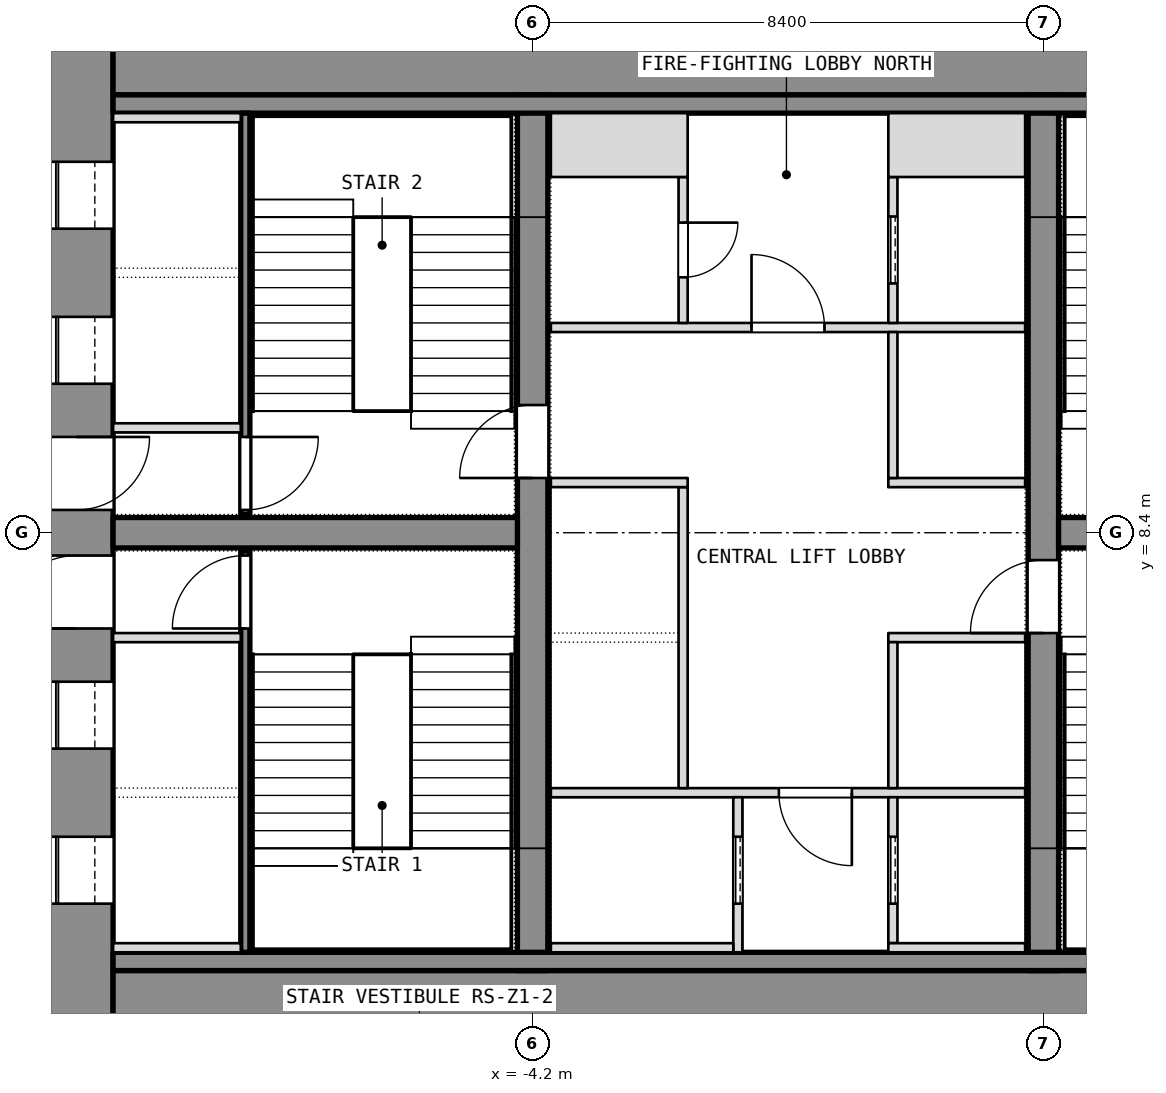
"""IFC4 building model, lengths in metres.
Left out: names, types, materials, properties, quantities, classifications, styles, units other than length and angle.
Written with IfcOpenShell. Run it as: python <this file> out.ifc"""

import sys

from ifc_helpers import new_model, si_unit, direction, frame, frame_2d, origin, place, context, subcontext, project, spatial, rectangle, extrude, element, fill, save


model = new_model("IFC4")
c1 = context("Model", 3, precision=1e-05, world=origin(), true_north=direction((0.0, 1.0)))
c2 = subcontext(c1, "Body", "Model", "MODEL_VIEW")
j1 = project(units=[si_unit("LENGTHUNIT", "METRE"), si_unit("PLANEANGLEUNIT", "RADIAN")], contexts=[c1])
p1 = place(None, origin())
s1 = spatial("IfcSite", under=j1, at=p1, CompositionType="ELEMENT")
p2 = place(p1, origin())
s2 = spatial("IfcBuilding", under=s1, at=p2, CompositionType="ELEMENT")
p3 = place(p2, frame((0.0, 0.0, 83.3)))
s3 = spatial("IfcBuildingStorey", under=s2, at=p3, CompositionType="ELEMENT", Elevation=83.3)
p4 = place(p3, frame((-11.7, 0.0, 0.0), z_axis=(0.0, 0.0, 1.0), x_axis=(0.0, 1.0, 0.0)))
e1 = element("IfcWall", 1, at=p4, inside=s3, PredefinedType="SHEAR", context=c2, shape_type="SweptSolid", body=[
    extrude(rectangle(XDim=16.8, YDim=1.2, at=frame_2d((8.4, 0.0))), origin(), (0.0, 0.0, 1.0), 3.6),
])
p5 = place(p4, frame((2.3, 0.0, 0.0)))
e2 = element("IfcOpeningElement", 2, at=p5, cuts=e1, PredefinedType="OPENING", context=c2, shape_type="SweptSolid", body=[
    extrude(rectangle(XDim=1.1, YDim=2.1, at=frame_2d((0.55, 1.05))), frame((0.0, 0.6, 0.0), z_axis=(0.0, -1.0, 0.0), x_axis=(1.0, 0.0, 0.0)), (0.0, 0.0, 1.0), 1.2),
])
p6 = place(p4, frame((4.85, 0.0, 0.0)))
e3 = element("IfcOpeningElement", 3, at=p6, cuts=e1, PredefinedType="OPENING", context=c2, shape_type="SweptSolid", body=[
    extrude(rectangle(XDim=1.1, YDim=2.1, at=frame_2d((0.55, 1.05))), frame((0.0, 0.6, 0.0), z_axis=(0.0, -1.0, 0.0), x_axis=(1.0, 0.0, 0.0)), (0.0, 0.0, 1.0), 1.2),
])
p7 = place(p4, frame((6.825, 0.0, 0.0)))
e4 = element("IfcOpeningElement", 4, at=p7, cuts=e1, PredefinedType="OPENING", context=c2, shape_type="SweptSolid", body=[
    extrude(rectangle(XDim=1.2, YDim=2.1, at=frame_2d((0.6, 1.05))), frame((0.0, 0.6, 0.0), z_axis=(0.0, -1.0, 0.0), x_axis=(1.0, 0.0, 0.0)), (0.0, 0.0, 1.0), 1.2),
])
p8 = place(p4, frame((13.4, 0.0, 0.0)))
e5 = element("IfcOpeningElement", 5, at=p8, cuts=e1, PredefinedType="OPENING", context=c2, shape_type="SweptSolid", body=[
    extrude(rectangle(XDim=1.1, YDim=2.1, at=frame_2d((0.55, 1.05))), frame((0.0, 0.6, 0.0), z_axis=(0.0, -1.0, 0.0), x_axis=(1.0, 0.0, 0.0)), (0.0, 0.0, 1.0), 1.2),
])
p9 = place(p4, frame((10.85, 0.0, 0.0)))
e6 = element("IfcOpeningElement", 6, at=p9, cuts=e1, PredefinedType="OPENING", context=c2, shape_type="SweptSolid", body=[
    extrude(rectangle(XDim=1.1, YDim=2.1, at=frame_2d((0.55, 1.05))), frame((0.0, 0.6, 0.0), z_axis=(0.0, -1.0, 0.0), x_axis=(1.0, 0.0, 0.0)), (0.0, 0.0, 1.0), 1.2),
])
p10 = place(p4, frame((8.775, 0.0, 0.0)))
e7 = element("IfcOpeningElement", 7, at=p10, cuts=e1, PredefinedType="OPENING", context=c2, shape_type="SweptSolid", body=[
    extrude(rectangle(XDim=1.2, YDim=2.1, at=frame_2d((0.6, 1.05))), frame((0.0, 0.6, 0.0), z_axis=(0.0, -1.0, 0.0), x_axis=(1.0, 0.0, 0.0)), (0.0, 0.0, 1.0), 1.2),
])
for number, where, z_axis, x_axis in (
    (8, (-11.1, 0.6, 0.0), (0.0, 0.0, 1.0), (1.0, 0.0, 0.0)),
    (9, (-11.1, 16.2, 0.0), (0.0, 0.0, 1.0), (1.0, 0.0, 0.0)),
):
    element("IfcWall", number, at=place(p3, frame(where, z_axis=z_axis, x_axis=x_axis)), inside=s3, PredefinedType="SHEAR", context=c2, shape_type="SweptSolid", body=[
        extrude(rectangle(XDim=22.2, YDim=1.2, at=frame_2d((11.1, 0.0))), origin(), (0.0, 0.0, 1.0), 3.6),
    ])
p11 = place(p3, frame((-4.2, 1.2, 0.0), z_axis=(0.0, 0.0, 1.0), x_axis=(0.0, 1.0, 0.0)))
e10 = element("IfcWall", 10, at=p11, inside=s3, PredefinedType="SHEAR", context=c2, shape_type="SweptSolid", body=[
    extrude(rectangle(XDim=14.4, YDim=0.5, at=frame_2d((7.2, 0.0))), origin(), (0.0, 0.0, 1.0), 3.6),
])
p12 = place(p11, frame((8.1, 0.0, 0.0)))
e11 = element("IfcOpeningElement", 11, at=p12, cuts=e10, PredefinedType="OPENING", context=c2, shape_type="SweptSolid", body=[
    extrude(rectangle(XDim=1.2, YDim=2.1, at=frame_2d((0.6, 1.05))), frame((0.0, 0.25, 0.0), z_axis=(0.0, -1.0, 0.0), x_axis=(1.0, 0.0, 0.0)), (0.0, 0.0, 1.0), 0.5),
])
p13 = place(p3, frame((4.2, 1.2, 0.0), z_axis=(0.0, 0.0, 1.0), x_axis=(0.0, 1.0, 0.0)))
e12 = element("IfcWall", 12, at=p13, inside=s3, PredefinedType="SHEAR", context=c2, shape_type="SweptSolid", body=[
    extrude(rectangle(XDim=14.4, YDim=0.5, at=frame_2d((7.2, 0.0))), origin(), (0.0, 0.0, 1.0), 3.6),
])
p14 = place(p13, frame((5.55, 0.0, 0.0)))
e13 = element("IfcOpeningElement", 13, at=p14, cuts=e12, PredefinedType="OPENING", context=c2, shape_type="SweptSolid", body=[
    extrude(rectangle(XDim=1.2, YDim=2.1, at=frame_2d((0.6, 1.05))), frame((0.0, 0.25, 0.0), z_axis=(0.0, -1.0, 0.0), x_axis=(1.0, 0.0, 0.0)), (0.0, 0.0, 1.0), 0.5),
])
for number, where, z_axis, x_axis in (
    (14, (-11.1, 8.4, 0.0), (0.0, 0.0, 1.0), (1.0, 0.0, 0.0)),
    (15, (4.45, 8.4, 0.0), (0.0, 0.0, 1.0), (1.0, 0.0, 0.0)),
):
    element("IfcWall", number, at=place(p3, frame(where, z_axis=z_axis, x_axis=x_axis)), inside=s3, PredefinedType="SHEAR", context=c2, shape_type="SweptSolid", body=[
        extrude(rectangle(XDim=6.65, YDim=0.5, at=frame_2d((3.325, 0.0))), origin(), (0.0, 0.0, 1.0), 3.6),
    ])
for number, where, z_axis, x_axis in (
    (16, (-11.1, 1.35, 0.0), (0.0, 0.0, 1.0), (1.0, 0.0, 0.0)),
    (17, (-11.1, 15.45, 0.0), (0.0, 0.0, 1.0), (1.0, 0.0, 0.0)),
):
    element("IfcWall", number, at=place(p3, frame(where, z_axis=z_axis, x_axis=x_axis)), inside=s3, PredefinedType="PARTITIONING", context=c2, shape_type="SweptSolid", body=[
        extrude(rectangle(XDim=22.2, YDim=0.3, at=frame_2d((11.1, 0.0))), origin(), (0.0, 0.0, 1.0), 3.3),
    ])
p15 = place(p3, frame((-8.925, 1.5, 0.0), z_axis=(0.0, 0.0, 1.0), x_axis=(0.0, 1.0, 0.0)))
e18 = element("IfcWall", 18, at=p15, inside=s3, PredefinedType="SHEAR", context=c2, shape_type="SweptSolid", body=[
    extrude(rectangle(XDim=6.6, YDim=0.15, at=frame_2d((3.3, 0.0))), origin(), (0.0, 0.0, 1.0), 3.3),
])
p16 = place(p15, frame((5.325, 0.0, 0.0)))
e19 = element("IfcOpeningElement", 19, at=p16, cuts=e18, PredefinedType="OPENING", context=c2, shape_type="SweptSolid", body=[
    extrude(rectangle(XDim=1.2, YDim=2.1, at=frame_2d((0.6, 1.05))), frame((0.0, 0.075, 0.0), z_axis=(0.0, -1.0, 0.0), x_axis=(1.0, 0.0, 0.0)), (0.0, 0.0, 1.0), 0.15),
])
for number, where, z_axis, x_axis in (
    (20, (-11.1, 6.675, 0.0), (0.0, 0.0, 1.0), (1.0, 0.0, 0.0)),
    (21, (-11.1, 1.575, 0.0), (0.0, 0.0, 1.0), (1.0, 0.0, 0.0)),
):
    element("IfcWall", number, at=place(p3, frame(where, z_axis=z_axis, x_axis=x_axis)), inside=s3, PredefinedType="SHEAR", context=c2, shape_type="SweptSolid", body=[
        extrude(rectangle(XDim=2.1, YDim=0.15, at=frame_2d((1.05, 0.0))), origin(), (0.0, 0.0, 1.0), 3.6),
    ])
p17 = place(p3, frame((-8.925, 8.7, 0.0), z_axis=(0.0, 0.0, 1.0), x_axis=(0.0, 1.0, 0.0)))
e22 = element("IfcWall", 22, at=p17, inside=s3, PredefinedType="SHEAR", context=c2, shape_type="SweptSolid", body=[
    extrude(rectangle(XDim=6.6, YDim=0.15, at=frame_2d((3.3, 0.0))), origin(), (0.0, 0.0, 1.0), 3.3),
])
p18 = place(p17, frame((0.075, 0.0, 0.0)))
e23 = element("IfcOpeningElement", 23, at=p18, cuts=e22, PredefinedType="OPENING", context=c2, shape_type="SweptSolid", body=[
    extrude(rectangle(XDim=1.2, YDim=2.1, at=frame_2d((0.6, 1.05))), frame((0.0, 0.075, 0.0), z_axis=(0.0, -1.0, 0.0), x_axis=(1.0, 0.0, 0.0)), (0.0, 0.0, 1.0), 0.15),
])
for number, where, z_axis, x_axis in (
    (24, (-11.1, 10.125, 0.0), (0.0, 0.0, 1.0), (1.0, 0.0, 0.0)),
    (25, (-11.1, 15.225, 0.0), (0.0, 0.0, 1.0), (1.0, 0.0, 0.0)),
):
    element("IfcWall", number, at=place(p3, frame(where, z_axis=z_axis, x_axis=x_axis)), inside=s3, PredefinedType="SHEAR", context=c2, shape_type="SweptSolid", body=[
        extrude(rectangle(XDim=2.1, YDim=0.15, at=frame_2d((1.05, 0.0))), origin(), (0.0, 0.0, 1.0), 3.6),
    ])
p19 = place(p3, frame((-3.9, 4.125, 0.0), z_axis=(0.0, 0.0, 1.0), x_axis=(1.0, 0.0, 0.0)))
e26 = element("IfcWall", 26, at=p19, inside=s3, PredefinedType="PARTITIONING", context=c2, shape_type="SweptSolid", body=[
    extrude(rectangle(XDim=7.8, YDim=0.15, at=frame_2d((3.9, 0.0))), origin(), (0.0, 0.0, 1.0), 3.3),
])
p20 = place(p19, frame((3.75, 0.0, 0.0)))
e27 = element("IfcOpeningElement", 27, at=p20, cuts=e26, PredefinedType="OPENING", context=c2, shape_type="SweptSolid", body=[
    extrude(rectangle(XDim=1.2, YDim=2.1, at=frame_2d((0.6, 1.05))), frame((0.0, 0.075, 0.0), z_axis=(0.0, -1.0, 0.0), x_axis=(1.0, 0.0, 0.0)), (0.0, 0.0, 1.0), 0.15),
])
p21 = place(p3, frame((-3.9, 11.775, 0.0), z_axis=(0.0, 0.0, 1.0), x_axis=(1.0, 0.0, 0.0)))
e28 = element("IfcWall", 28, at=p21, inside=s3, PredefinedType="PARTITIONING", context=c2, shape_type="SweptSolid", body=[
    extrude(rectangle(XDim=7.8, YDim=0.15, at=frame_2d((3.9, 0.0))), origin(), (0.0, 0.0, 1.0), 3.3),
])
p22 = place(p21, frame((3.3, 0.0, 0.0)))
e29 = element("IfcOpeningElement", 29, at=p22, cuts=e28, PredefinedType="OPENING", context=c2, shape_type="SweptSolid", body=[
    extrude(rectangle(XDim=1.2, YDim=2.1, at=frame_2d((0.6, 1.05))), frame((0.0, 0.075, 0.0), z_axis=(0.0, -1.0, 0.0), x_axis=(1.0, 0.0, 0.0)), (0.0, 0.0, 1.0), 0.15),
])
p23 = place(p3, frame((-0.825, 1.5, 0.0), z_axis=(0.0, 0.0, 1.0), x_axis=(0.0, 1.0, 0.0)))
e30 = element("IfcWall", 30, at=p23, inside=s3, PredefinedType="SHEAR", context=c2, shape_type="SweptSolid", body=[
    extrude(rectangle(XDim=2.55, YDim=0.15, at=frame_2d((1.275, 0.0))), origin(), (0.0, 0.0, 1.0), 3.6),
])
p24 = place(p23, frame((0.8, 0.0, 0.0)))
e31 = element("IfcOpeningElement", 31, at=p24, cuts=e30, PredefinedType="OPENING", context=c2, shape_type="SweptSolid", body=[
    extrude(rectangle(XDim=1.1, YDim=2.1, at=frame_2d((0.55, 1.05))), frame((0.0, 0.075, 0.0), z_axis=(0.0, -1.0, 0.0), x_axis=(1.0, 0.0, 0.0)), (0.0, 0.0, 1.0), 0.15),
])
p25 = place(p3, frame((-3.9, 1.575, 0.0), z_axis=(0.0, 0.0, 1.0), x_axis=(1.0, 0.0, 0.0)))
e32 = element("IfcWall", 32, at=p25, inside=s3, PredefinedType="SHEAR", context=c2, shape_type="SweptSolid", body=[
    extrude(rectangle(XDim=3.0, YDim=0.15, at=frame_2d((1.5, 0.0))), origin(), (0.0, 0.0, 1.0), 3.6),
])
p26 = place(p3, frame((-1.725, 4.2, 0.0), z_axis=(0.0, 0.0, 1.0), x_axis=(0.0, 1.0, 0.0)))
e33 = element("IfcWall", 33, at=p26, inside=s3, PredefinedType="SHEAR", context=c2, shape_type="SweptSolid", body=[
    extrude(rectangle(XDim=4.95, YDim=0.15, at=frame_2d((2.475, 0.0))), origin(), (0.0, 0.0, 1.0), 3.6),
])
p27 = place(p3, frame((-3.9, 9.225, 0.0), z_axis=(0.0, 0.0, 1.0), x_axis=(1.0, 0.0, 0.0)))
e34 = element("IfcWall", 34, at=p27, inside=s3, PredefinedType="SHEAR", context=c2, shape_type="SweptSolid", body=[
    extrude(rectangle(XDim=2.25, YDim=0.15, at=frame_2d((1.125, 0.0))), origin(), (0.0, 0.0, 1.0), 3.6),
])
p28 = place(p3, frame((-1.725, 11.85, 0.0), z_axis=(0.0, 0.0, 1.0), x_axis=(0.0, 1.0, 0.0)))
e35 = element("IfcWall", 35, at=p28, inside=s3, PredefinedType="PARTITIONING", context=c2, shape_type="SweptSolid", body=[
    extrude(rectangle(XDim=2.4, YDim=0.15, at=frame_2d((1.2, 0.0))), origin(), (0.0, 0.0, 1.0), 3.3),
])
p29 = place(p28, frame((0.75, 0.0, 0.0)))
e36 = element("IfcOpeningElement", 36, at=p29, cuts=e35, PredefinedType="OPENING", context=c2, shape_type="SweptSolid", body=[
    extrude(rectangle(XDim=0.9, YDim=2.1, at=frame_2d((0.45, 1.05))), frame((0.0, 0.075, 0.0), z_axis=(0.0, -1.0, 0.0), x_axis=(1.0, 0.0, 0.0)), (0.0, 0.0, 1.0), 0.15),
])
p30 = place(p3, frame((-3.9, 14.775, 0.0), z_axis=(0.0, 0.0, 1.0), x_axis=(1.0, 0.0, 0.0)))
e37 = element("IfcWall", 37, at=p30, inside=s3, PredefinedType="PARTITIONING", context=c2, shape_type="SweptSolid", body=[
    extrude(rectangle(XDim=2.25, YDim=1.05, at=frame_2d((1.125, 0.0))), origin(), (0.0, 0.0, 1.0), 3.3),
])
p31 = place(p3, frame((1.725, 1.65, 0.0), z_axis=(0.0, 0.0, 1.0), x_axis=(0.0, 1.0, 0.0)))
e38 = element("IfcWall", 38, at=p31, inside=s3, PredefinedType="SHEAR", context=c2, shape_type="SweptSolid", body=[
    extrude(rectangle(XDim=2.4, YDim=0.15, at=frame_2d((1.2, 0.0))), origin(), (0.0, 0.0, 1.0), 3.6),
])
p32 = place(p31, frame((0.65, 0.0, 0.0)))
e39 = element("IfcOpeningElement", 39, at=p32, cuts=e38, PredefinedType="OPENING", context=c2, shape_type="SweptSolid", body=[
    extrude(rectangle(XDim=1.1, YDim=2.1, at=frame_2d((0.55, 1.05))), frame((0.0, 0.075, 0.0), z_axis=(0.0, -1.0, 0.0), x_axis=(1.0, 0.0, 0.0)), (0.0, 0.0, 1.0), 0.15),
])
p33 = place(p3, frame((1.65, 1.575, 0.0), z_axis=(0.0, 0.0, 1.0), x_axis=(1.0, 0.0, 0.0)))
e40 = element("IfcWall", 40, at=p33, inside=s3, PredefinedType="SHEAR", context=c2, shape_type="SweptSolid", body=[
    extrude(rectangle(XDim=2.25, YDim=0.15, at=frame_2d((1.125, 0.0))), origin(), (0.0, 0.0, 1.0), 3.6),
])
p34 = place(p3, frame((1.725, 11.85, 0.0), z_axis=(0.0, 0.0, 1.0), x_axis=(0.0, 1.0, 0.0)))
e41 = element("IfcWall", 41, at=p34, inside=s3, PredefinedType="SHEAR", context=c2, shape_type="SweptSolid", body=[
    extrude(rectangle(XDim=2.4, YDim=0.15, at=frame_2d((1.2, 0.0))), origin(), (0.0, 0.0, 1.0), 3.6),
])
p35 = place(p34, frame((0.65, 0.0, 0.0)))
e42 = element("IfcOpeningElement", 42, at=p35, cuts=e41, PredefinedType="OPENING", context=c2, shape_type="SweptSolid", body=[
    extrude(rectangle(XDim=1.1, YDim=2.1, at=frame_2d((0.55, 1.05))), frame((0.0, 0.075, 0.0), z_axis=(0.0, -1.0, 0.0), x_axis=(1.0, 0.0, 0.0)), (0.0, 0.0, 1.0), 0.15),
])
p36 = place(p3, frame((1.65, 14.775, 0.0), z_axis=(0.0, 0.0, 1.0), x_axis=(1.0, 0.0, 0.0)))
e43 = element("IfcWall", 43, at=p36, inside=s3, PredefinedType="SHEAR", context=c2, shape_type="SweptSolid", body=[
    extrude(rectangle(XDim=2.25, YDim=1.05, at=frame_2d((1.125, 0.0))), origin(), (0.0, 0.0, 1.0), 3.6),
])
for number, where, z_axis, x_axis in (
    (44, (1.65, 6.675, 0.0), (0.0, 0.0, 1.0), (1.0, 0.0, 0.0)),
    (45, (1.65, 9.225, 0.0), (0.0, 0.0, 1.0), (1.0, 0.0, 0.0)),
):
    element("IfcWall", number, at=place(p3, frame(where, z_axis=z_axis, x_axis=x_axis)), inside=s3, PredefinedType="SHEAR", context=c2, shape_type="SweptSolid", body=[
        extrude(rectangle(XDim=2.25, YDim=0.15, at=frame_2d((1.125, 0.0))), origin(), (0.0, 0.0, 1.0), 3.6),
    ])
p37 = place(p3, frame((1.725, 4.2, 0.0), z_axis=(0.0, 0.0, 1.0), x_axis=(0.0, 1.0, 0.0)))
e46 = element("IfcWall", 46, at=p37, inside=s3, PredefinedType="SHEAR", context=c2, shape_type="SweptSolid", body=[
    extrude(rectangle(XDim=2.4, YDim=0.15, at=frame_2d((1.2, 0.0))), origin(), (0.0, 0.0, 1.0), 3.6),
])
p38 = place(p3, frame((1.725, 9.3, 0.0), z_axis=(0.0, 0.0, 1.0), x_axis=(0.0, 1.0, 0.0)))
e47 = element("IfcWall", 47, at=p38, inside=s3, PredefinedType="SHEAR", context=c2, shape_type="SweptSolid", body=[
    extrude(rectangle(XDim=2.4, YDim=0.15, at=frame_2d((1.2, 0.0))), origin(), (0.0, 0.0, 1.0), 3.6),
])
p39 = place(p5, origin())
e48 = element("IfcDoor", 48, at=p39, inside=s3, OperationType="SLIDING_TO_LEFT", PredefinedType="DOOR", context=c2, shape_type="SweptSolid", body=[
    extrude(rectangle(XDim=1.1, YDim=2.1, at=frame_2d((0.55, 1.05))), frame((0.0, 0.025, 0.0), z_axis=(0.0, -1.0, 0.0), x_axis=(1.0, 0.0, 0.0)), (0.0, 0.0, 1.0), 0.05),
])
fill(e2, e48)
p40 = place(p6, origin())
e49 = element("IfcDoor", 49, at=p40, inside=s3, OperationType="SLIDING_TO_LEFT", PredefinedType="DOOR", context=c2, shape_type="SweptSolid", body=[
    extrude(rectangle(XDim=1.1, YDim=2.1, at=frame_2d((0.55, 1.05))), frame((0.0, 0.025, 0.0), z_axis=(0.0, -1.0, 0.0), x_axis=(1.0, 0.0, 0.0)), (0.0, 0.0, 1.0), 0.05),
])
fill(e3, e49)
p41 = place(p7, origin())
e50 = element("IfcDoor", 50, at=p41, inside=s3, OperationType="SINGLE_SWING_LEFT", PredefinedType="DOOR", context=c2, shape_type="SweptSolid", body=[
    extrude(rectangle(XDim=1.2, YDim=2.1, at=frame_2d((0.6, 1.05))), frame((0.0, 0.025, 0.0), z_axis=(0.0, -1.0, 0.0), x_axis=(1.0, 0.0, 0.0)), (0.0, 0.0, 1.0), 0.05),
])
fill(e4, e50)
p42 = place(p16, origin())
e51 = element("IfcDoor", 51, at=p42, inside=s3, OperationType="SINGLE_SWING_LEFT", PredefinedType="DOOR", context=c2, shape_type="SweptSolid", body=[
    extrude(rectangle(XDim=1.2, YDim=2.1, at=frame_2d((0.6, 1.05))), frame((0.0, 0.025, 0.0), z_axis=(0.0, -1.0, 0.0), x_axis=(1.0, 0.0, 0.0)), (0.0, 0.0, 1.0), 0.05),
])
fill(e19, e51)
p43 = place(p8, origin())
e52 = element("IfcDoor", 52, at=p43, inside=s3, OperationType="SLIDING_TO_LEFT", PredefinedType="DOOR", context=c2, shape_type="SweptSolid", body=[
    extrude(rectangle(XDim=1.1, YDim=2.1, at=frame_2d((0.55, 1.05))), frame((0.0, 0.025, 0.0), z_axis=(0.0, -1.0, 0.0), x_axis=(1.0, 0.0, 0.0)), (0.0, 0.0, 1.0), 0.05),
])
fill(e5, e52)
p44 = place(p9, origin())
e53 = element("IfcDoor", 53, at=p44, inside=s3, OperationType="SLIDING_TO_LEFT", PredefinedType="DOOR", context=c2, shape_type="SweptSolid", body=[
    extrude(rectangle(XDim=1.1, YDim=2.1, at=frame_2d((0.55, 1.05))), frame((0.0, 0.025, 0.0), z_axis=(0.0, -1.0, 0.0), x_axis=(1.0, 0.0, 0.0)), (0.0, 0.0, 1.0), 0.05),
])
fill(e6, e53)
p45 = place(p10, origin())
e54 = element("IfcDoor", 54, at=p45, inside=s3, OperationType="SINGLE_SWING_LEFT", PredefinedType="DOOR", context=c2, shape_type="SweptSolid", body=[
    extrude(rectangle(XDim=1.2, YDim=2.1, at=frame_2d((0.6, 1.05))), frame((0.0, 0.025, 0.0), z_axis=(0.0, -1.0, 0.0), x_axis=(1.0, 0.0, 0.0)), (0.0, 0.0, 1.0), 0.05),
])
fill(e7, e54)
p46 = place(p18, origin())
e55 = element("IfcDoor", 55, at=p46, inside=s3, OperationType="SINGLE_SWING_LEFT", PredefinedType="DOOR", context=c2, shape_type="SweptSolid", body=[
    extrude(rectangle(XDim=1.2, YDim=2.1, at=frame_2d((0.6, 1.05))), frame((0.0, 0.025, 0.0), z_axis=(0.0, -1.0, 0.0), x_axis=(1.0, 0.0, 0.0)), (0.0, 0.0, 1.0), 0.05),
])
fill(e23, e55)
p47 = place(p24, origin())
e56 = element("IfcDoor", 56, at=p47, inside=s3, OperationType="SLIDING_TO_LEFT", PredefinedType="DOOR", context=c2, shape_type="SweptSolid", body=[
    extrude(rectangle(XDim=1.1, YDim=2.1, at=frame_2d((0.55, 1.05))), frame((0.0, 0.025, 0.0), z_axis=(0.0, -1.0, 0.0), x_axis=(1.0, 0.0, 0.0)), (0.0, 0.0, 1.0), 0.05),
])
fill(e31, e56)
p48 = place(p32, origin())
e57 = element("IfcDoor", 57, at=p48, inside=s3, OperationType="SLIDING_TO_LEFT", PredefinedType="DOOR", context=c2, shape_type="SweptSolid", body=[
    extrude(rectangle(XDim=1.1, YDim=2.1, at=frame_2d((0.55, 1.05))), frame((0.0, 0.025, 0.0), z_axis=(0.0, -1.0, 0.0), x_axis=(1.0, 0.0, 0.0)), (0.0, 0.0, 1.0), 0.05),
])
fill(e39, e57)
p49 = place(p35, origin())
e58 = element("IfcDoor", 58, at=p49, inside=s3, OperationType="SLIDING_TO_LEFT", PredefinedType="DOOR", context=c2, shape_type="SweptSolid", body=[
    extrude(rectangle(XDim=1.1, YDim=2.1, at=frame_2d((0.55, 1.05))), frame((0.0, 0.025, 0.0), z_axis=(0.0, -1.0, 0.0), x_axis=(1.0, 0.0, 0.0)), (0.0, 0.0, 1.0), 0.05),
])
fill(e42, e58)
p50 = place(p20, origin())
e59 = element("IfcDoor", 59, at=p50, inside=s3, OperationType="SINGLE_SWING_LEFT", PredefinedType="DOOR", context=c2, shape_type="SweptSolid", body=[
    extrude(rectangle(XDim=1.2, YDim=2.1, at=frame_2d((0.6, 1.05))), frame((0.0, 0.025, 0.0), z_axis=(0.0, -1.0, 0.0), x_axis=(1.0, 0.0, 0.0)), (0.0, 0.0, 1.0), 0.05),
])
fill(e27, e59)
p51 = place(p22, origin())
e60 = element("IfcDoor", 60, at=p51, inside=s3, OperationType="SINGLE_SWING_LEFT", PredefinedType="DOOR", context=c2, shape_type="SweptSolid", body=[
    extrude(rectangle(XDim=1.2, YDim=2.1, at=frame_2d((0.6, 1.05))), frame((0.0, 0.025, 0.0), z_axis=(0.0, -1.0, 0.0), x_axis=(1.0, 0.0, 0.0)), (0.0, 0.0, 1.0), 0.05),
])
fill(e29, e60)
p52 = place(p29, origin())
e61 = element("IfcDoor", 61, at=p52, inside=s3, OperationType="SINGLE_SWING_LEFT", PredefinedType="DOOR", context=c2, shape_type="SweptSolid", body=[
    extrude(rectangle(XDim=0.9, YDim=2.1, at=frame_2d((0.45, 1.05))), frame((0.0, 0.025, 0.0), z_axis=(0.0, -1.0, 0.0), x_axis=(1.0, 0.0, 0.0)), (0.0, 0.0, 1.0), 0.05),
])
fill(e36, e61)
p53 = place(p12, origin())
e62 = element("IfcDoor", 62, at=p53, inside=s3, OperationType="SINGLE_SWING_LEFT", PredefinedType="DOOR", context=c2, shape_type="SweptSolid", body=[
    extrude(rectangle(XDim=1.2, YDim=2.1, at=frame_2d((0.6, 1.05))), frame((0.0, 0.025, 0.0), z_axis=(0.0, -1.0, 0.0), x_axis=(1.0, 0.0, 0.0)), (0.0, 0.0, 1.0), 0.05),
])
fill(e11, e62)
p54 = place(p14, origin())
e63 = element("IfcDoor", 63, at=p54, inside=s3, OperationType="SINGLE_SWING_LEFT", PredefinedType="DOOR", context=c2, shape_type="SweptSolid", body=[
    extrude(rectangle(XDim=1.2, YDim=2.1, at=frame_2d((0.6, 1.05))), frame((0.0, 0.025, 0.0), z_axis=(0.0, -1.0, 0.0), x_axis=(1.0, 0.0, 0.0)), (0.0, 0.0, 1.0), 0.05),
])
fill(e13, e63)
save(model, sys.argv[1])
